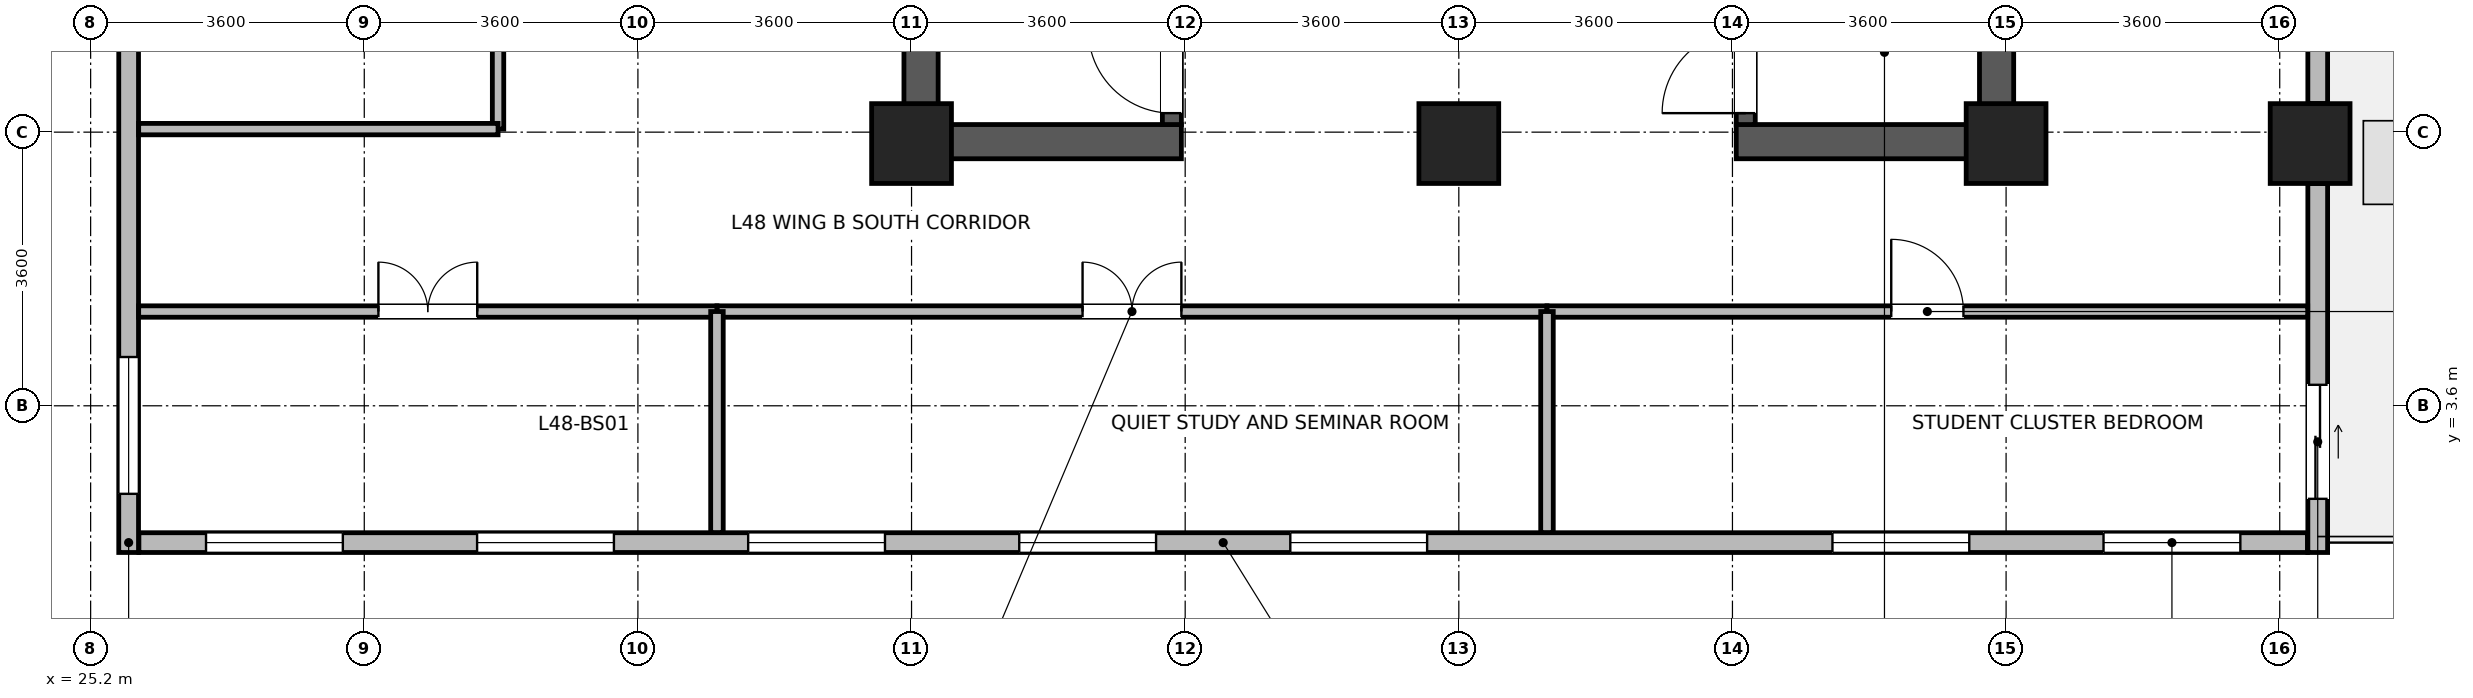
"""IFC4 building model, lengths in metres.
Left out: names, types, materials, properties, quantities, classifications, styles, units other than length and angle.
Written with IfcOpenShell. Run it as: python <this file> out.ifc"""

import sys

from ifc_helpers import new_model, si_unit, direction, frame, frame_2d, origin, origin_2d, place, context, subcontext, project, spatial, rectangle, extrude, source, transform, mapped, element, fill, save


model = new_model("IFC4")
c1 = context("Model", 3, precision=1e-05, world=origin(), true_north=direction((0.0, 1.0)))
c2 = subcontext(c1, "Body", "Model", "MODEL_VIEW")
j1 = project(units=[si_unit("LENGTHUNIT", "METRE"), si_unit("PLANEANGLEUNIT", "RADIAN")], contexts=[c1])
p1 = place(None, origin())
s1 = spatial("IfcSite", under=j1, at=p1, CompositionType="ELEMENT")
p2 = place(p1, origin())
s2 = spatial("IfcBuilding", under=s1, at=p2, CompositionType="ELEMENT")
p3 = place(p2, frame((0.0, 0.0, 188.3)))
s3 = spatial("IfcBuildingStorey", under=s2, at=p3, CompositionType="ELEMENT", Elevation=188.3)
for number, where, z_axis, x_axis in (
    (1, (36.125, 6.85, 0.0), (0.0, 0.0, 1.0), (0.0, 1.0, 0.0)),
    (2, (50.275, 6.85, 0.0), (0.0, 0.0, 1.0), (0.0, 1.0, 0.0)),
):
    element("IfcWall", number, at=place(p3, frame(where, z_axis=z_axis, x_axis=x_axis)), inside=s3, PredefinedType="SHEAR", context=c2, shape_type="SweptSolid", body=[
        extrude(rectangle(XDim=7.9, YDim=0.45, at=frame_2d((3.95, 0.0))), origin(), (0.0, 0.0, 1.0), 3.34),
    ])
for number, where, z_axis, x_axis in (
    (3, (36.35, 7.075, 0.0), (0.0, 0.0, 1.0), (1.0, 0.0, 0.0)),
    (4, (46.85, 7.075, 0.0), (0.0, 0.0, 1.0), (1.0, 0.0, 0.0)),
):
    element("IfcWall", number, at=place(p3, frame(where, z_axis=z_axis, x_axis=x_axis)), inside=s3, PredefinedType="SHEAR", context=c2, shape_type="SweptSolid", body=[
        extrude(rectangle(XDim=3.2, YDim=0.45, at=frame_2d((1.6, 0.0))), origin(), (0.0, 0.0, 1.0), 3.34),
    ])
p4 = place(p3, frame((39.425, 7.3, 0.0), z_axis=(0.0, 0.0, 1.0), x_axis=(0.0, 1.0, 0.0)))
e5 = element("IfcWall", 5, at=p4, inside=s3, PredefinedType="SHEAR", context=c2, shape_type="SweptSolid", body=[
    extrude(rectangle(XDim=7.0, YDim=0.25, at=frame_2d((3.5, 0.0))), origin(), (0.0, 0.0, 1.0), 3.34),
])
p5 = place(p4, frame((0.15, 0.0, 0.0)))
e6 = element("IfcOpeningElement", 6, at=p5, cuts=e5, PredefinedType="OPENING", context=c2, shape_type="SweptSolid", body=[
    extrude(rectangle(XDim=1.1, YDim=2.08, at=frame_2d((0.55, 1.04))), frame((0.0, 0.135, 0.0), z_axis=(0.0, -1.0, 0.0), x_axis=(1.0, 0.0, 0.0)), (0.0, 0.0, 1.0), 0.27),
])
p6 = place(p3, frame((46.975, 7.3, 0.0), z_axis=(0.0, 0.0, 1.0), x_axis=(0.0, 1.0, 0.0)))
e7 = element("IfcWall", 7, at=p6, inside=s3, PredefinedType="SHEAR", context=c2, shape_type="SweptSolid", body=[
    extrude(rectangle(XDim=7.0, YDim=0.25, at=frame_2d((3.5, 0.0))), origin(), (0.0, 0.0, 1.0), 3.34),
])
p7 = place(p6, frame((0.15, 0.0, 0.0)))
e8 = element("IfcOpeningElement", 8, at=p7, cuts=e7, PredefinedType="OPENING", context=c2, shape_type="SweptSolid", body=[
    extrude(rectangle(XDim=1.1, YDim=2.08, at=frame_2d((0.55, 1.04))), frame((0.0, 0.135, 0.0), z_axis=(0.0, -1.0, 0.0), x_axis=(1.0, 0.0, 0.0)), (0.0, 0.0, 1.0), 0.27),
])
m1 = source(origin(), c2, "Body", "SweptSolid", [
    extrude(rectangle(XDim=1.05, YDim=1.05, at=origin_2d()), origin(), (0.0, 0.0, 1.0), 3.7),
])
for number, where, z_axis, x_axis in (
    (9, (36.0, 7.05, 0.0), (0.0, 0.0, 1.0), (1.0, 0.0, 0.0)),
    (10, (43.2, 7.05, 0.0), (0.0, 0.0, 1.0), (1.0, 0.0, 0.0)),
    (11, (50.4, 7.05, 0.0), (0.0, 0.0, 1.0), (1.0, 0.0, 0.0)),
    (12, (54.4, 7.05, 0.0), (0.0, 0.0, 1.0), (1.0, 0.0, 0.0)),
):
    element("IfcColumn", number, at=place(p3, frame(where, z_axis=z_axis, x_axis=x_axis)), inside=s3, PredefinedType="COLUMN", context=c2, shape_type="MappedRepresentation", body=[
        mapped(m1, transform((0.0, 0.0, 0.0), x_axis=(1.0, 0.0, 0.0), y_axis=(0.0, 1.0, 0.0), z_axis=(0.0, 0.0, 1.0), scale=1.0)),
    ])
p8 = place(p3, frame((54.365, 1.8, 0.0), z_axis=(0.0, 0.0, 1.0), x_axis=(-1.0, 0.0, 0.0)))
e13 = element("IfcWall", 13, at=p8, inside=s3, PredefinedType="STANDARD", context=c2, shape_type="SweptSolid", body=[
    extrude(rectangle(XDim=28.53, YDim=0.26, at=frame_2d((14.265, 0.0))), origin(), (0.0, 0.0, 1.0), 3.32),
])
p9 = place(p8, frame((0.883, 0.0, 0.85)))
e14 = element("IfcOpeningElement", 14, at=p9, cuts=e13, PredefinedType="OPENING", context=c2, shape_type="SweptSolid", body=[
    extrude(rectangle(XDim=1.8, YDim=1.85, at=frame_2d((0.9, 0.925))), frame((0.0, 0.14, 0.0), z_axis=(0.0, -1.0, 0.0), x_axis=(1.0, 0.0, 0.0)), (0.0, 0.0, 1.0), 0.28),
])
p10 = place(p8, frame((4.449, 0.0, 0.85)))
e15 = element("IfcOpeningElement", 15, at=p10, cuts=e13, PredefinedType="OPENING", context=c2, shape_type="SweptSolid", body=[
    extrude(rectangle(XDim=1.8, YDim=1.85, at=frame_2d((0.9, 0.925))), frame((0.0, 0.14, 0.0), z_axis=(0.0, -1.0, 0.0), x_axis=(1.0, 0.0, 0.0)), (0.0, 0.0, 1.0), 0.28),
])
p11 = place(p8, frame((11.582, 0.0, 0.85)))
e16 = element("IfcOpeningElement", 16, at=p11, cuts=e13, PredefinedType="OPENING", context=c2, shape_type="SweptSolid", body=[
    extrude(rectangle(XDim=1.8, YDim=1.85, at=frame_2d((0.9, 0.925))), frame((0.0, 0.14, 0.0), z_axis=(0.0, -1.0, 0.0), x_axis=(1.0, 0.0, 0.0)), (0.0, 0.0, 1.0), 0.28),
])
p12 = place(p8, frame((15.148, 0.0, 0.85)))
e17 = element("IfcOpeningElement", 17, at=p12, cuts=e13, PredefinedType="OPENING", context=c2, shape_type="SweptSolid", body=[
    extrude(rectangle(XDim=1.8, YDim=1.85, at=frame_2d((0.9, 0.925))), frame((0.0, 0.14, 0.0), z_axis=(0.0, -1.0, 0.0), x_axis=(1.0, 0.0, 0.0)), (0.0, 0.0, 1.0), 0.28),
])
p13 = place(p8, frame((18.714, 0.0, 0.85)))
e18 = element("IfcOpeningElement", 18, at=p13, cuts=e13, PredefinedType="OPENING", context=c2, shape_type="SweptSolid", body=[
    extrude(rectangle(XDim=1.8, YDim=1.85, at=frame_2d((0.9, 0.925))), frame((0.0, 0.14, 0.0), z_axis=(0.0, -1.0, 0.0), x_axis=(1.0, 0.0, 0.0)), (0.0, 0.0, 1.0), 0.28),
])
p14 = place(p8, frame((22.281, 0.0, 0.85)))
e19 = element("IfcOpeningElement", 19, at=p14, cuts=e13, PredefinedType="OPENING", context=c2, shape_type="SweptSolid", body=[
    extrude(rectangle(XDim=1.8, YDim=1.85, at=frame_2d((0.9, 0.925))), frame((0.0, 0.14, 0.0), z_axis=(0.0, -1.0, 0.0), x_axis=(1.0, 0.0, 0.0)), (0.0, 0.0, 1.0), 0.28),
])
p15 = place(p8, frame((25.847, 0.0, 0.85)))
e20 = element("IfcOpeningElement", 20, at=p15, cuts=e13, PredefinedType="OPENING", context=c2, shape_type="SweptSolid", body=[
    extrude(rectangle(XDim=1.8, YDim=1.85, at=frame_2d((0.9, 0.925))), frame((0.0, 0.14, 0.0), z_axis=(0.0, -1.0, 0.0), x_axis=(1.0, 0.0, 0.0)), (0.0, 0.0, 1.0), 0.28),
])
p16 = place(p3, frame((54.5, 6.524, 0.0), z_axis=(0.0, 0.0, 1.0), x_axis=(0.0, -1.0, 0.0)))
e21 = element("IfcWall", 21, at=p16, inside=s3, PredefinedType="STANDARD", context=c2, shape_type="SweptSolid", body=[
    extrude(rectangle(XDim=4.854, YDim=0.26, at=frame_2d((2.427, 0.0))), origin(), (0.0, 0.0, 1.0), 3.32),
])
p17 = place(p16, frame((2.648, 0.0, 0.0)))
e22 = element("IfcOpeningElement", 22, at=p17, cuts=e21, PredefinedType="OPENING", context=c2, shape_type="SweptSolid", body=[
    extrude(rectangle(XDim=1.5, YDim=2.15, at=frame_2d((0.75, 1.075))), frame((0.0, 0.14, 0.0), z_axis=(0.0, -1.0, 0.0), x_axis=(1.0, 0.0, 0.0)), (0.0, 0.0, 1.0), 0.28),
])
p18 = place(p3, frame((54.5, 14.024, 0.0), z_axis=(0.0, 0.0, 1.0), x_axis=(0.0, -1.0, 0.0)))
e23 = element("IfcWall", 23, at=p18, inside=s3, PredefinedType="STANDARD", context=c2, shape_type="SweptSolid", body=[
    extrude(rectangle(XDim=6.448, YDim=0.26, at=frame_2d((3.224, 0.0))), origin(), (0.0, 0.0, 1.0), 2.87),
])
p19 = place(p18, frame((3.936, 0.0, 0.85)))
e24 = element("IfcOpeningElement", 24, at=p19, cuts=e23, PredefinedType="OPENING", context=c2, shape_type="SweptSolid", body=[
    extrude(rectangle(XDim=1.8, YDim=1.85, at=frame_2d((0.9, 0.925))), frame((0.0, 0.14, 0.0), z_axis=(0.0, -1.0, 0.0), x_axis=(1.0, 0.0, 0.0)), (0.0, 0.0, 1.0), 0.28),
])
p20 = place(p18, frame((1.15, 0.0, 0.85)))
e25 = element("IfcOpeningElement", 25, at=p20, cuts=e23, PredefinedType="OPENING", context=c2, shape_type="SweptSolid", body=[
    extrude(rectangle(XDim=0.95, YDim=1.75, at=frame_2d((0.475, 0.875))), frame((0.0, 0.14, 0.0), z_axis=(0.0, -1.0, 0.0), x_axis=(1.0, 0.0, 0.0)), (0.0, 0.0, 1.0), 0.28),
])
p21 = place(p3, frame((25.7, 1.67, 0.0), z_axis=(0.0, 0.0, 1.0), x_axis=(0.0, 1.0, 0.0)))
e26 = element("IfcWall", 26, at=p21, inside=s3, PredefinedType="STANDARD", context=c2, shape_type="SweptSolid", body=[
    extrude(rectangle(XDim=20.06, YDim=0.26, at=frame_2d((10.03, 0.0))), origin(), (0.0, 0.0, 1.0), 3.32),
])
p22 = place(p21, frame((0.772, 0.0, 0.85)))
e27 = element("IfcOpeningElement", 27, at=p22, cuts=e26, PredefinedType="OPENING", context=c2, shape_type="SweptSolid", body=[
    extrude(rectangle(XDim=1.8, YDim=1.85, at=frame_2d((0.9, 0.925))), frame((0.0, 0.14, 0.0), z_axis=(0.0, -1.0, 0.0), x_axis=(1.0, 0.0, 0.0)), (0.0, 0.0, 1.0), 0.28),
])
p23 = place(p21, frame((7.458, 0.0, 0.85)))
e28 = element("IfcOpeningElement", 28, at=p23, cuts=e26, PredefinedType="OPENING", context=c2, shape_type="SweptSolid", body=[
    extrude(rectangle(XDim=1.8, YDim=1.85, at=frame_2d((0.9, 0.925))), frame((0.0, 0.14, 0.0), z_axis=(0.0, -1.0, 0.0), x_axis=(1.0, 0.0, 0.0)), (0.0, 0.0, 1.0), 0.28),
])
p24 = place(p21, frame((14.145, 0.0, 0.85)))
e29 = element("IfcOpeningElement", 29, at=p24, cuts=e26, PredefinedType="OPENING", context=c2, shape_type="SweptSolid", body=[
    extrude(rectangle(XDim=1.8, YDim=1.85, at=frame_2d((0.9, 0.925))), frame((0.0, 0.14, 0.0), z_axis=(0.0, -1.0, 0.0), x_axis=(1.0, 0.0, 0.0)), (0.0, 0.0, 1.0), 0.28),
])
p25 = place(p21, frame((17.488, 0.0, 0.85)))
e30 = element("IfcOpeningElement", 30, at=p25, cuts=e26, PredefinedType="OPENING", context=c2, shape_type="SweptSolid", body=[
    extrude(rectangle(XDim=1.8, YDim=1.85, at=frame_2d((0.9, 0.925))), frame((0.0, 0.14, 0.0), z_axis=(0.0, -1.0, 0.0), x_axis=(1.0, 0.0, 0.0)), (0.0, 0.0, 1.0), 0.28),
])
p26 = place(p3, frame((33.44, 4.84, 0.0), z_axis=(0.0, 0.0, 1.0), x_axis=(1.0, 0.0, 0.0)))
e31 = element("IfcWall", 31, at=p26, inside=s3, PredefinedType="PARTITIONING", context=c2, shape_type="SweptSolid", body=[
    extrude(rectangle(XDim=10.92, YDim=0.15, at=frame_2d((5.46, 0.0))), origin(), (0.0, 0.0, 1.0), 3.32),
])
p27 = place(p26, frame((4.81, 0.0, 0.0)))
e32 = element("IfcOpeningElement", 32, at=p27, cuts=e31, PredefinedType="OPENING", context=c2, shape_type="SweptSolid", body=[
    extrude(rectangle(XDim=1.3, YDim=2.12, at=frame_2d((0.65, 1.06))), frame((0.0, 0.085, 0.0), z_axis=(0.0, -1.0, 0.0), x_axis=(1.0, 0.0, 0.0)), (0.0, 0.0, 1.0), 0.17),
])
p28 = place(p3, frame((44.36, 4.84, 0.0), z_axis=(0.0, 0.0, 1.0), x_axis=(1.0, 0.0, 0.0)))
e33 = element("IfcWall", 33, at=p28, inside=s3, PredefinedType="PARTITIONING", context=c2, shape_type="SweptSolid", body=[
    extrude(rectangle(XDim=10.008, YDim=0.15, at=frame_2d((5.004, 0.0))), origin(), (0.0, 0.0, 1.0), 3.32),
])
p29 = place(p28, frame((4.529, 0.0, 0.0)))
e34 = element("IfcOpeningElement", 34, at=p29, cuts=e33, PredefinedType="OPENING", context=c2, shape_type="SweptSolid", body=[
    extrude(rectangle(XDim=0.95, YDim=2.1, at=frame_2d((0.475, 1.05))), frame((0.0, 0.085, 0.0), z_axis=(0.0, -1.0, 0.0), x_axis=(1.0, 0.0, 0.0)), (0.0, 0.0, 1.0), 0.17),
])
p30 = place(p3, frame((25.832, 4.84, 0.0), z_axis=(0.0, 0.0, 1.0), x_axis=(1.0, 0.0, 0.0)))
e35 = element("IfcWall", 35, at=p30, inside=s3, PredefinedType="PARTITIONING", context=c2, shape_type="SweptSolid", body=[
    extrude(rectangle(XDim=7.608, YDim=0.15, at=frame_2d((3.804, 0.0))), origin(), (0.0, 0.0, 1.0), 3.32),
])
p31 = place(p30, frame((3.154, 0.0, 0.0)))
e36 = element("IfcOpeningElement", 36, at=p31, cuts=e35, PredefinedType="OPENING", context=c2, shape_type="SweptSolid", body=[
    extrude(rectangle(XDim=1.3, YDim=2.12, at=frame_2d((0.65, 1.06))), frame((0.0, 0.085, 0.0), z_axis=(0.0, -1.0, 0.0), x_axis=(1.0, 0.0, 0.0)), (0.0, 0.0, 1.0), 0.17),
])
p32 = place(p3, frame((30.56, 7.24, 0.0), z_axis=(0.0, 0.0, 1.0), x_axis=(0.0, 1.0, 0.0)))
e37 = element("IfcWall", 37, at=p32, inside=s3, PredefinedType="PARTITIONING", context=c2, shape_type="SweptSolid", body=[
    extrude(rectangle(XDim=7.26, YDim=0.15, at=frame_2d((3.63, 0.0))), origin(), (0.0, 0.0, 1.0), 3.32),
])
p33 = place(p32, frame((2.98, 0.0, 0.0)))
e38 = element("IfcOpeningElement", 38, at=p33, cuts=e37, PredefinedType="OPENING", context=c2, shape_type="SweptSolid", body=[
    extrude(rectangle(XDim=1.3, YDim=2.12, at=frame_2d((0.65, 1.06))), frame((0.0, 0.085, 0.0), z_axis=(0.0, -1.0, 0.0), x_axis=(1.0, 0.0, 0.0)), (0.0, 0.0, 1.0), 0.17),
])
p34 = place(p3, frame((25.832, 7.24, 0.0), z_axis=(0.0, 0.0, 1.0), x_axis=(1.0, 0.0, 0.0)))
e39 = element("IfcWall", 39, at=p34, inside=s3, PredefinedType="PARTITIONING", context=c2, shape_type="SweptSolid", body=[
    extrude(rectangle(XDim=4.728, YDim=0.15, at=frame_2d((2.364, 0.0))), origin(), (0.0, 0.0, 1.0), 3.32),
])
for number, where, z_axis, x_axis in (
    (40, (33.44, 1.932, 0.0), (0.0, 0.0, 1.0), (0.0, 1.0, 0.0)),
    (41, (44.36, 1.932, 0.0), (0.0, 0.0, 1.0), (0.0, 1.0, 0.0)),
):
    element("IfcWall", number, at=place(p3, frame(where, z_axis=z_axis, x_axis=x_axis)), inside=s3, PredefinedType="PARTITIONING", context=c2, shape_type="SweptSolid", body=[
        extrude(rectangle(XDim=2.908, YDim=0.165, at=frame_2d((1.454, 0.0))), origin(), (0.0, 0.0, 1.0), 3.32),
    ])
p35 = place(p9, origin())
e42 = element("IfcWindow", 42, at=p35, inside=s3, PartitioningType="SINGLE_PANEL", PredefinedType="WINDOW", context=c2, shape_type="SweptSolid", body=[
    extrude(rectangle(XDim=1.8, YDim=1.85, at=frame_2d((0.9, 0.925))), frame((0.0, 0.03, 0.0), z_axis=(0.0, -1.0, 0.0), x_axis=(1.0, 0.0, 0.0)), (0.0, 0.0, 1.0), 0.06),
])
fill(e14, e42)
p36 = place(p10, origin())
e43 = element("IfcWindow", 43, at=p36, inside=s3, PartitioningType="SINGLE_PANEL", PredefinedType="WINDOW", context=c2, shape_type="SweptSolid", body=[
    extrude(rectangle(XDim=1.8, YDim=1.85, at=frame_2d((0.9, 0.925))), frame((0.0, 0.03, 0.0), z_axis=(0.0, -1.0, 0.0), x_axis=(1.0, 0.0, 0.0)), (0.0, 0.0, 1.0), 0.06),
])
fill(e15, e43)
p37 = place(p11, origin())
e44 = element("IfcWindow", 44, at=p37, inside=s3, PartitioningType="SINGLE_PANEL", PredefinedType="WINDOW", context=c2, shape_type="SweptSolid", body=[
    extrude(rectangle(XDim=1.8, YDim=1.85, at=frame_2d((0.9, 0.925))), frame((0.0, 0.03, 0.0), z_axis=(0.0, -1.0, 0.0), x_axis=(1.0, 0.0, 0.0)), (0.0, 0.0, 1.0), 0.06),
])
fill(e16, e44)
p38 = place(p12, origin())
e45 = element("IfcWindow", 45, at=p38, inside=s3, PartitioningType="SINGLE_PANEL", PredefinedType="WINDOW", context=c2, shape_type="SweptSolid", body=[
    extrude(rectangle(XDim=1.8, YDim=1.85, at=frame_2d((0.9, 0.925))), frame((0.0, 0.03, 0.0), z_axis=(0.0, -1.0, 0.0), x_axis=(1.0, 0.0, 0.0)), (0.0, 0.0, 1.0), 0.06),
])
fill(e17, e45)
p39 = place(p13, origin())
e46 = element("IfcWindow", 46, at=p39, inside=s3, PartitioningType="SINGLE_PANEL", PredefinedType="WINDOW", context=c2, shape_type="SweptSolid", body=[
    extrude(rectangle(XDim=1.8, YDim=1.85, at=frame_2d((0.9, 0.925))), frame((0.0, 0.03, 0.0), z_axis=(0.0, -1.0, 0.0), x_axis=(1.0, 0.0, 0.0)), (0.0, 0.0, 1.0), 0.06),
])
fill(e18, e46)
p40 = place(p14, origin())
e47 = element("IfcWindow", 47, at=p40, inside=s3, PartitioningType="SINGLE_PANEL", PredefinedType="WINDOW", context=c2, shape_type="SweptSolid", body=[
    extrude(rectangle(XDim=1.8, YDim=1.85, at=frame_2d((0.9, 0.925))), frame((0.0, 0.03, 0.0), z_axis=(0.0, -1.0, 0.0), x_axis=(1.0, 0.0, 0.0)), (0.0, 0.0, 1.0), 0.06),
])
fill(e19, e47)
p41 = place(p15, origin())
e48 = element("IfcWindow", 48, at=p41, inside=s3, PartitioningType="SINGLE_PANEL", PredefinedType="WINDOW", context=c2, shape_type="SweptSolid", body=[
    extrude(rectangle(XDim=1.8, YDim=1.85, at=frame_2d((0.9, 0.925))), frame((0.0, 0.03, 0.0), z_axis=(0.0, -1.0, 0.0), x_axis=(1.0, 0.0, 0.0)), (0.0, 0.0, 1.0), 0.06),
])
fill(e20, e48)
p42 = place(p17, origin())
e49 = element("IfcDoor", 49, at=p42, inside=s3, OperationType="SLIDING_TO_LEFT", PredefinedType="DOOR", context=c2, shape_type="SweptSolid", body=[
    extrude(rectangle(XDim=1.5, YDim=2.15, at=frame_2d((0.75, 1.075))), frame((0.0, 0.025, 0.0), z_axis=(0.0, -1.0, 0.0), x_axis=(1.0, 0.0, 0.0)), (0.0, 0.0, 1.0), 0.05),
])
fill(e22, e49)
p43 = place(p22, origin())
e50 = element("IfcWindow", 50, at=p43, inside=s3, PartitioningType="SINGLE_PANEL", PredefinedType="WINDOW", context=c2, shape_type="SweptSolid", body=[
    extrude(rectangle(XDim=1.8, YDim=1.85, at=frame_2d((0.9, 0.925))), frame((0.0, 0.03, 0.0), z_axis=(0.0, -1.0, 0.0), x_axis=(1.0, 0.0, 0.0)), (0.0, 0.0, 1.0), 0.06),
])
fill(e27, e50)
p44 = place(p5, origin())
e51 = element("IfcDoor", 51, at=p44, inside=s3, OperationType="SINGLE_SWING_RIGHT", PredefinedType="DOOR", context=c2, shape_type="SweptSolid", body=[
    extrude(rectangle(XDim=1.1, YDim=2.08, at=frame_2d((0.55, 1.04))), frame((0.0, 0.025, 0.0), z_axis=(0.0, -1.0, 0.0), x_axis=(1.0, 0.0, 0.0)), (0.0, 0.0, 1.0), 0.05),
])
fill(e6, e51)
p45 = place(p7, origin())
e52 = element("IfcDoor", 52, at=p45, inside=s3, OperationType="SINGLE_SWING_LEFT", PredefinedType="DOOR", context=c2, shape_type="SweptSolid", body=[
    extrude(rectangle(XDim=1.1, YDim=2.08, at=frame_2d((0.55, 1.04))), frame((0.0, 0.025, 0.0), z_axis=(0.0, -1.0, 0.0), x_axis=(1.0, 0.0, 0.0)), (0.0, 0.0, 1.0), 0.05),
])
fill(e8, e52)
p46 = place(p27, origin())
e53 = element("IfcDoor", 53, at=p46, inside=s3, OperationType="DOUBLE_DOOR_SINGLE_SWING", PredefinedType="DOOR", context=c2, shape_type="SweptSolid", body=[
    extrude(rectangle(XDim=1.3, YDim=2.12, at=frame_2d((0.65, 1.06))), frame((0.0, 0.025, 0.0), z_axis=(0.0, -1.0, 0.0), x_axis=(1.0, 0.0, 0.0)), (0.0, 0.0, 1.0), 0.05),
])
fill(e32, e53)
p47 = place(p29, origin())
e54 = element("IfcDoor", 54, at=p47, inside=s3, OperationType="SINGLE_SWING_LEFT", PredefinedType="DOOR", context=c2, shape_type="SweptSolid", body=[
    extrude(rectangle(XDim=0.95, YDim=2.1, at=frame_2d((0.475, 1.05))), frame((0.0, 0.025, 0.0), z_axis=(0.0, -1.0, 0.0), x_axis=(1.0, 0.0, 0.0)), (0.0, 0.0, 1.0), 0.05),
])
fill(e34, e54)
p48 = place(p31, origin())
e55 = element("IfcDoor", 55, at=p48, inside=s3, OperationType="DOUBLE_DOOR_SINGLE_SWING", PredefinedType="DOOR", context=c2, shape_type="SweptSolid", body=[
    extrude(rectangle(XDim=1.3, YDim=2.12, at=frame_2d((0.65, 1.06))), frame((0.0, 0.025, 0.0), z_axis=(0.0, -1.0, 0.0), x_axis=(1.0, 0.0, 0.0)), (0.0, 0.0, 1.0), 0.05),
])
fill(e36, e55)
save(model, sys.argv[1])
